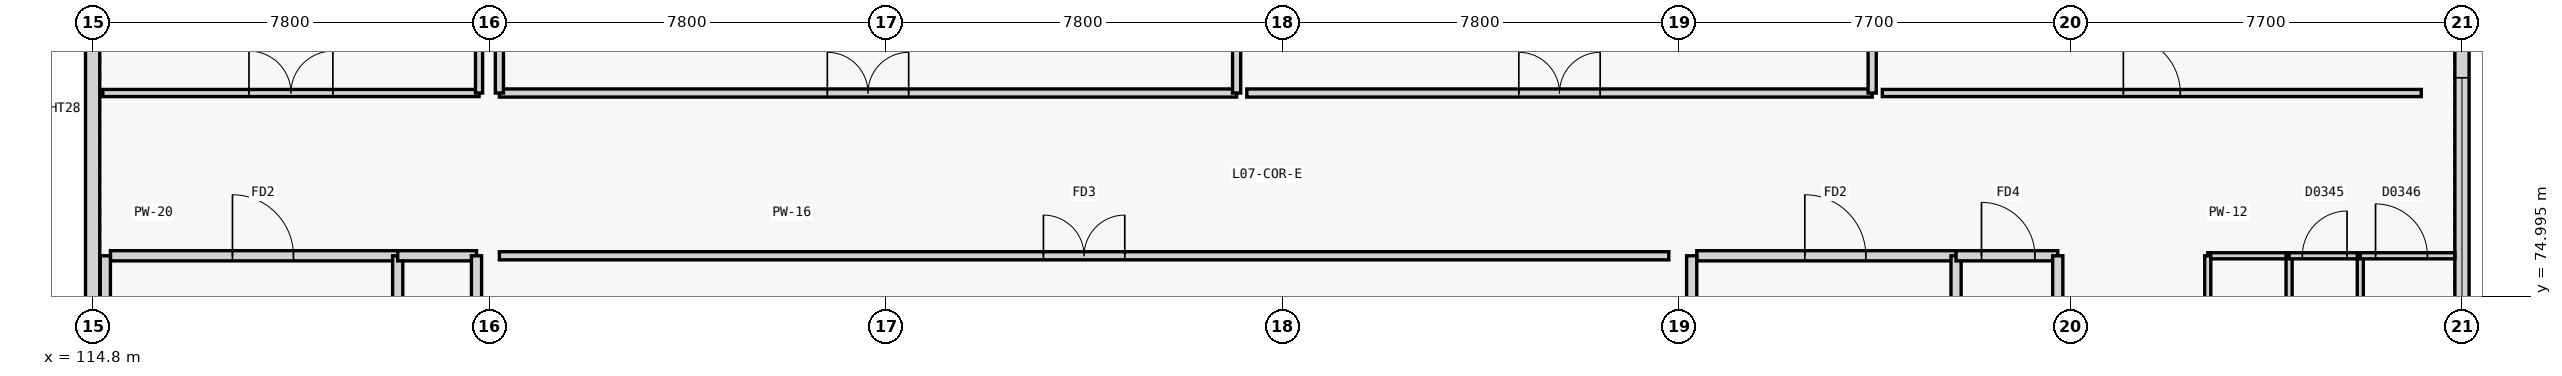
"""IFC4 building model, lengths in metres.
Left out: names, types, materials, properties, quantities, classifications, styles, units other than length and angle.
Written with IfcOpenShell. Run it as: python <this file> out.ifc"""

import sys

from ifc_helpers import new_model, si_unit, direction, frame, frame_2d, origin, place, context, subcontext, project, spatial, rectangle, extrude, element, fill, save


model = new_model("IFC4")
c1 = context("Model", 3, precision=1e-05, world=origin(), true_north=direction((0.0, 1.0)))
c2 = subcontext(c1, "Body", "Model", "MODEL_VIEW")
j1 = project(units=[si_unit("LENGTHUNIT", "METRE"), si_unit("PLANEANGLEUNIT", "RADIAN")], contexts=[c1])
p1 = place(None, origin())
s1 = spatial("IfcSite", under=j1, at=p1, CompositionType="ELEMENT")
p2 = place(p1, origin())
s2 = spatial("IfcBuilding", under=s1, at=p2, CompositionType="ELEMENT")
p3 = place(p2, frame((0.0, 0.0, 28.8)))
s3 = spatial("IfcBuildingStorey", under=s2, at=p3, CompositionType="ELEMENT", Elevation=28.8)
p4 = place(p3, frame((161.4, 96.792, 0.0), z_axis=(0.0, 0.0, 1.0), x_axis=(0.0, -1.0, 0.0)))
e1 = element("IfcWall", 1, at=p4, inside=s3, PredefinedType="SOLIDWALL", context=c2, shape_type="SweptSolid", body=[
    extrude(rectangle(XDim=32.584, YDim=0.28, at=frame_2d((16.292, 0.0))), origin(), (0.0, 0.0, 1.0), 2.78),
])
p5 = place(p4, frame((17.492, 0.0, 0.82)))
e2 = element("IfcOpeningElement", 2, at=p5, cuts=e1, PredefinedType="OPENING", context=c2, shape_type="SweptSolid", body=[
    extrude(rectangle(XDim=4.8, YDim=1.55, at=frame_2d((2.4, 0.775))), frame((0.0, 0.15, 0.0), z_axis=(0.0, -1.0, 0.0), x_axis=(1.0, 0.0, 0.0)), (0.0, 0.0, 1.0), 0.3),
])
p6 = place(p3, frame((114.8, 72.6, 0.0), z_axis=(0.0, 0.0, 1.0), x_axis=(0.0, 1.0, 0.0)))
e3 = element("IfcWall", 3, at=p6, inside=s3, PredefinedType="SOLIDWALL", context=c2, shape_type="SweptSolid", body=[
    extrude(rectangle(XDim=12.2, YDim=0.28, at=frame_2d((6.1, 0.0))), origin(), (0.0, 0.0, 1.0), 2.78),
])
p7 = place(p3, frame((115.15, 75.8, 0.0), z_axis=(0.0, 0.0, 1.0), x_axis=(1.0, 0.0, 0.0)))
e4 = element("IfcWall", 4, at=p7, inside=s3, PredefinedType="PARTITIONING", context=c2, shape_type="SweptSolid", body=[
    extrude(rectangle(XDim=5.65, YDim=0.2, at=frame_2d((2.825, 0.0))), origin(), (0.0, 0.0, 1.0), 3.32),
])
p8 = place(p7, frame((2.4, 0.0, 0.0)))
e5 = element("IfcOpeningElement", 5, at=p8, cuts=e4, PredefinedType="OPENING", context=c2, shape_type="SweptSolid", body=[
    extrude(rectangle(XDim=1.2, YDim=2.2, at=frame_2d((0.6, 1.1))), frame((0.0, 0.11, 0.0), z_axis=(0.0, -1.0, 0.0), x_axis=(1.0, 0.0, 0.0)), (0.0, 0.0, 1.0), 0.22),
])
p9 = place(p3, frame((115.05, 72.4, 0.0), z_axis=(0.0, 0.0, 1.0), x_axis=(0.0, 1.0, 0.0)))
e6 = element("IfcWall", 6, at=p9, inside=s3, PredefinedType="PARTITIONING", context=c2, shape_type="SweptSolid", body=[
    extrude(rectangle(XDim=3.4, YDim=0.2, at=frame_2d((1.7, 0.0))), origin(), (0.0, 0.0, 1.0), 2.78),
])
p10 = place(p3, frame((120.8, 72.4, 0.0), z_axis=(0.0, 0.0, 1.0), x_axis=(0.0, 1.0, 0.0)))
e7 = element("IfcWall", 7, at=p10, inside=s3, PredefinedType="PARTITIONING", context=c2, shape_type="SweptSolid", body=[
    extrude(rectangle(XDim=3.4, YDim=0.2, at=frame_2d((1.7, 0.0))), origin(), (0.0, 0.0, 1.0), 3.32),
])
p11 = place(p10, frame((1.1, 0.0, 0.0)))
e8 = element("IfcOpeningElement", 8, at=p11, cuts=e7, PredefinedType="OPENING", context=c2, shape_type="SweptSolid", body=[
    extrude(rectangle(XDim=1.2, YDim=2.2, at=frame_2d((0.6, 1.1))), frame((0.0, 0.11, 0.0), z_axis=(0.0, -1.0, 0.0), x_axis=(1.0, 0.0, 0.0)), (0.0, 0.0, 1.0), 0.22),
])
p12 = place(p3, frame((120.8, 75.8, 0.0), z_axis=(0.0, 0.0, 1.0), x_axis=(1.0, 0.0, 0.0)))
e9 = element("IfcWall", 9, at=p12, inside=s3, PredefinedType="PARTITIONING", context=c2, shape_type="SweptSolid", body=[
    extrude(rectangle(XDim=1.55, YDim=0.2, at=frame_2d((0.775, 0.0))), origin(), (0.0, 0.0, 1.0), 3.32),
])
p13 = place(p3, frame((122.35, 72.4, 0.0), z_axis=(0.0, 0.0, 1.0), x_axis=(0.0, 1.0, 0.0)))
e10 = element("IfcWall", 10, at=p13, inside=s3, PredefinedType="PARTITIONING", context=c2, shape_type="SweptSolid", body=[
    extrude(rectangle(XDim=3.4, YDim=0.2, at=frame_2d((1.7, 0.0))), origin(), (0.0, 0.0, 1.0), 2.82),
])
p14 = place(p3, frame((146.35, 75.8, 0.0), z_axis=(0.0, 0.0, 1.0), x_axis=(1.0, 0.0, 0.0)))
e11 = element("IfcWall", 11, at=p14, inside=s3, PredefinedType="PARTITIONING", context=c2, shape_type="SweptSolid", body=[
    extrude(rectangle(XDim=5.1, YDim=0.2, at=frame_2d((2.55, 0.0))), origin(), (0.0, 0.0, 1.0), 3.32),
])
p15 = place(p14, frame((2.125, 0.0, 0.0)))
e12 = element("IfcOpeningElement", 12, at=p15, cuts=e11, PredefinedType="OPENING", context=c2, shape_type="SweptSolid", body=[
    extrude(rectangle(XDim=1.2, YDim=2.2, at=frame_2d((0.6, 1.1))), frame((0.0, 0.11, 0.0), z_axis=(0.0, -1.0, 0.0), x_axis=(1.0, 0.0, 0.0)), (0.0, 0.0, 1.0), 0.22),
])
p16 = place(p3, frame((146.25, 72.4, 0.0), z_axis=(0.0, 0.0, 1.0), x_axis=(0.0, 1.0, 0.0)))
e13 = element("IfcWall", 13, at=p16, inside=s3, PredefinedType="PARTITIONING", context=c2, shape_type="SweptSolid", body=[
    extrude(rectangle(XDim=3.4, YDim=0.2, at=frame_2d((1.7, 0.0))), origin(), (0.0, 0.0, 1.0), 2.82),
])
p17 = place(p3, frame((151.45, 72.4, 0.0), z_axis=(0.0, 0.0, 1.0), x_axis=(0.0, 1.0, 0.0)))
e14 = element("IfcWall", 14, at=p17, inside=s3, PredefinedType="PARTITIONING", context=c2, shape_type="SweptSolid", body=[
    extrude(rectangle(XDim=3.4, YDim=0.2, at=frame_2d((1.7, 0.0))), origin(), (0.0, 0.0, 1.0), 3.32),
])
p18 = place(p17, frame((1.1, 0.0, 0.0)))
e15 = element("IfcOpeningElement", 15, at=p18, cuts=e14, PredefinedType="OPENING", context=c2, shape_type="SweptSolid", body=[
    extrude(rectangle(XDim=1.2, YDim=2.2, at=frame_2d((0.6, 1.1))), frame((0.0, 0.11, 0.0), z_axis=(0.0, -1.0, 0.0), x_axis=(1.0, 0.0, 0.0)), (0.0, 0.0, 1.0), 0.22),
])
p19 = place(p3, frame((151.45, 75.8, 0.0), z_axis=(0.0, 0.0, 1.0), x_axis=(1.0, 0.0, 0.0)))
e16 = element("IfcWall", 16, at=p19, inside=s3, PredefinedType="PARTITIONING", context=c2, shape_type="SweptSolid", body=[
    extrude(rectangle(XDim=2.0, YDim=0.2, at=frame_2d((1.0, 0.0))), origin(), (0.0, 0.0, 1.0), 3.32),
])
p20 = place(p19, frame((0.5, 0.0, 0.0)))
e17 = element("IfcOpeningElement", 17, at=p20, cuts=e16, PredefinedType="OPENING", context=c2, shape_type="SweptSolid", body=[
    extrude(rectangle(XDim=1.05, YDim=2.15, at=frame_2d((0.525, 1.075))), frame((0.0, 0.11, 0.0), z_axis=(0.0, -1.0, 0.0), x_axis=(1.0, 0.0, 0.0)), (0.0, 0.0, 1.0), 0.22),
])
p21 = place(p3, frame((153.45, 72.4, 0.0), z_axis=(0.0, 0.0, 1.0), x_axis=(0.0, 1.0, 0.0)))
e18 = element("IfcWall", 18, at=p21, inside=s3, PredefinedType="PARTITIONING", context=c2, shape_type="SweptSolid", body=[
    extrude(rectangle(XDim=3.4, YDim=0.2, at=frame_2d((1.7, 0.0))), origin(), (0.0, 0.0, 1.0), 2.82),
])
p22 = place(p3, frame((115.0, 79.0, 0.0), z_axis=(0.0, 0.0, 1.0), x_axis=(1.0, 0.0, 0.0)))
e19 = element("IfcWall", 19, at=p22, inside=s3, PredefinedType="PARTITIONING", context=c2, shape_type="SweptSolid", body=[
    extrude(rectangle(XDim=7.4, YDim=0.14, at=frame_2d((3.7, 0.0))), origin(), (0.0, 0.0, 1.0), 3.34),
])
p23 = place(p22, frame((2.875, 0.0, 0.0)))
e20 = element("IfcOpeningElement", 20, at=p23, cuts=e19, PredefinedType="OPENING", context=c2, shape_type="SweptSolid", body=[
    extrude(rectangle(XDim=1.65, YDim=2.3, at=frame_2d((0.825, 1.15))), frame((0.0, 0.08, 0.0), z_axis=(0.0, -1.0, 0.0), x_axis=(1.0, 0.0, 0.0)), (0.0, 0.0, 1.0), 0.16),
])
p24 = place(p3, frame((122.4, 79.0, 0.0), z_axis=(0.0, 0.0, 1.0), x_axis=(0.0, 1.0, 0.0)))
e21 = element("IfcWall", 21, at=p24, inside=s3, PredefinedType="PARTITIONING", context=c2, shape_type="SweptSolid", body=[
    extrude(rectangle(XDim=5.4, YDim=0.14, at=frame_2d((2.7, 0.0))), origin(), (0.0, 0.0, 1.0), 2.82),
])
p25 = place(p3, frame((122.8, 75.8, 0.0), z_axis=(0.0, 0.0, 1.0), x_axis=(1.0, 0.0, 0.0)))
e22 = element("IfcWall", 22, at=p25, inside=s3, PredefinedType="PARTITIONING", context=c2, shape_type="SweptSolid", body=[
    extrude(rectangle(XDim=23.0, YDim=0.16, at=frame_2d((11.5, 0.0))), origin(), (0.0, 0.0, 1.0), 3.34),
])
p26 = place(p25, frame((10.7, 0.0, 0.0)))
e23 = element("IfcOpeningElement", 23, at=p26, cuts=e22, PredefinedType="OPENING", context=c2, shape_type="SweptSolid", body=[
    extrude(rectangle(XDim=1.6, YDim=2.2, at=frame_2d((0.8, 1.1))), frame((0.0, 0.09, 0.0), z_axis=(0.0, -1.0, 0.0), x_axis=(1.0, 0.0, 0.0)), (0.0, 0.0, 1.0), 0.18),
])
p27 = place(p3, frame((156.4, 75.8, 0.0), z_axis=(0.0, 0.0, 1.0), x_axis=(1.0, 0.0, 0.0)))
e24 = element("IfcWall", 24, at=p27, inside=s3, PredefinedType="PARTITIONING", context=c2, shape_type="SweptSolid", body=[
    extrude(rectangle(XDim=1.6, YDim=0.12, at=frame_2d((0.8, 0.0))), origin(), (0.0, 0.0, 1.0), 3.34),
])
p28 = place(p3, frame((156.4, 70.6, 0.0), z_axis=(0.0, 0.0, 1.0), x_axis=(0.0, 1.0, 0.0)))
e25 = element("IfcWall", 25, at=p28, inside=s3, PredefinedType="PARTITIONING", context=c2, shape_type="SweptSolid", body=[
    extrude(rectangle(XDim=5.2, YDim=0.12, at=frame_2d((2.6, 0.0))), origin(), (0.0, 0.0, 1.0), 3.34),
])
p29 = place(p28, frame((2.16, 0.0, 0.0)))
e26 = element("IfcOpeningElement", 26, at=p29, cuts=e25, PredefinedType="OPENING", context=c2, shape_type="SweptSolid", body=[
    extrude(rectangle(XDim=0.88, YDim=2.1, at=frame_2d((0.44, 1.05))), frame((0.0, 0.07, 0.0), z_axis=(0.0, -1.0, 0.0), x_axis=(1.0, 0.0, 0.0)), (0.0, 0.0, 1.0), 0.14),
])
p30 = place(p3, frame((158.0, 70.6, 0.0), z_axis=(0.0, 0.0, 1.0), x_axis=(0.0, 1.0, 0.0)))
e27 = element("IfcWall", 27, at=p30, inside=s3, PredefinedType="PARTITIONING", context=c2, shape_type="SweptSolid", body=[
    extrude(rectangle(XDim=5.2, YDim=0.12, at=frame_2d((2.6, 0.0))), origin(), (0.0, 0.0, 1.0), 3.34),
])
p31 = place(p3, frame((158.0, 75.8, 0.0), z_axis=(0.0, 0.0, 1.0), x_axis=(1.0, 0.0, 0.0)))
e28 = element("IfcWall", 28, at=p31, inside=s3, PredefinedType="PARTITIONING", context=c2, shape_type="SweptSolid", body=[
    extrude(rectangle(XDim=1.4, YDim=0.12, at=frame_2d((0.7, 0.0))), origin(), (0.0, 0.0, 1.0), 3.34),
])
p32 = place(p31, frame((0.26, 0.0, 0.0)))
e29 = element("IfcOpeningElement", 29, at=p32, cuts=e28, PredefinedType="OPENING", context=c2, shape_type="SweptSolid", body=[
    extrude(rectangle(XDim=0.88, YDim=2.1, at=frame_2d((0.44, 1.05))), frame((0.0, 0.07, 0.0), z_axis=(0.0, -1.0, 0.0), x_axis=(1.0, 0.0, 0.0)), (0.0, 0.0, 1.0), 0.14),
])
p33 = place(p3, frame((159.4, 70.6, 0.0), z_axis=(0.0, 0.0, 1.0), x_axis=(0.0, 1.0, 0.0)))
e30 = element("IfcWall", 30, at=p33, inside=s3, PredefinedType="PARTITIONING", context=c2, shape_type="SweptSolid", body=[
    extrude(rectangle(XDim=5.2, YDim=0.12, at=frame_2d((2.6, 0.0))), origin(), (0.0, 0.0, 1.0), 3.34),
])
p34 = place(p3, frame((159.4, 75.8, 0.0), z_axis=(0.0, 0.0, 1.0), x_axis=(1.0, 0.0, 0.0)))
e31 = element("IfcWall", 31, at=p34, inside=s3, PredefinedType="PARTITIONING", context=c2, shape_type="SweptSolid", body=[
    extrude(rectangle(XDim=1.86, YDim=0.12, at=frame_2d((0.93, 0.0))), origin(), (0.0, 0.0, 1.0), 3.34),
])
p35 = place(p34, frame((0.3, 0.0, 0.0)))
e32 = element("IfcOpeningElement", 32, at=p35, cuts=e31, PredefinedType="OPENING", context=c2, shape_type="SweptSolid", body=[
    extrude(rectangle(XDim=1.02, YDim=2.1, at=frame_2d((0.51, 1.05))), frame((0.0, 0.07, 0.0), z_axis=(0.0, -1.0, 0.0), x_axis=(1.0, 0.0, 0.0)), (0.0, 0.0, 1.0), 0.14),
])
p36 = place(p3, frame((122.8, 79.0, 0.0), z_axis=(0.0, 0.0, 1.0), x_axis=(1.0, 0.0, 0.0)))
e33 = element("IfcWall", 33, at=p36, inside=s3, PredefinedType="PARTITIONING", context=c2, shape_type="SweptSolid", body=[
    extrude(rectangle(XDim=14.5, YDim=0.16, at=frame_2d((7.25, 0.0))), origin(), (0.0, 0.0, 1.0), 3.34),
])
p37 = place(p36, frame((6.45, 0.0, 0.0)))
e34 = element("IfcOpeningElement", 34, at=p37, cuts=e33, PredefinedType="OPENING", context=c2, shape_type="SweptSolid", body=[
    extrude(rectangle(XDim=1.6, YDim=2.2, at=frame_2d((0.8, 1.1))), frame((0.0, 0.09, 0.0), z_axis=(0.0, -1.0, 0.0), x_axis=(1.0, 0.0, 0.0)), (0.0, 0.0, 1.0), 0.18),
])
p38 = place(p3, frame((122.8, 79.0, 0.0), z_axis=(0.0, 0.0, 1.0), x_axis=(0.0, 1.0, 0.0)))
e35 = element("IfcWall", 35, at=p38, inside=s3, PredefinedType="PARTITIONING", context=c2, shape_type="SweptSolid", body=[
    extrude(rectangle(XDim=17.6, YDim=0.16, at=frame_2d((8.8, 0.0))), origin(), (0.0, 0.0, 1.0), 2.82),
])
p39 = place(p3, frame((137.3, 79.0, 0.0), z_axis=(0.0, 0.0, 1.0), x_axis=(0.0, 1.0, 0.0)))
e36 = element("IfcWall", 36, at=p39, inside=s3, PredefinedType="PARTITIONING", context=c2, shape_type="SweptSolid", body=[
    extrude(rectangle(XDim=17.6, YDim=0.16, at=frame_2d((8.8, 0.0))), origin(), (0.0, 0.0, 1.0), 3.34),
])
p40 = place(p3, frame((137.5, 79.0, 0.0), z_axis=(0.0, 0.0, 1.0), x_axis=(1.0, 0.0, 0.0)))
e37 = element("IfcWall", 37, at=p40, inside=s3, PredefinedType="PARTITIONING", context=c2, shape_type="SweptSolid", body=[
    extrude(rectangle(XDim=12.3, YDim=0.16, at=frame_2d((6.15, 0.0))), origin(), (0.0, 0.0, 1.0), 3.34),
])
p41 = place(p40, frame((5.35, 0.0, 0.0)))
e38 = element("IfcOpeningElement", 38, at=p41, cuts=e37, PredefinedType="OPENING", context=c2, shape_type="SweptSolid", body=[
    extrude(rectangle(XDim=1.6, YDim=2.2, at=frame_2d((0.8, 1.1))), frame((0.0, 0.09, 0.0), z_axis=(0.0, -1.0, 0.0), x_axis=(1.0, 0.0, 0.0)), (0.0, 0.0, 1.0), 0.18),
])
p42 = place(p3, frame((149.8, 79.0, 0.0), z_axis=(0.0, 0.0, 1.0), x_axis=(0.0, 1.0, 0.0)))
e39 = element("IfcWall", 39, at=p42, inside=s3, PredefinedType="PARTITIONING", context=c2, shape_type="SweptSolid", body=[
    extrude(rectangle(XDim=17.6, YDim=0.16, at=frame_2d((8.8, 0.0))), origin(), (0.0, 0.0, 1.0), 2.9),
])
p43 = place(p3, frame((150.0, 79.0, 0.0), z_axis=(0.0, 0.0, 1.0), x_axis=(1.0, 0.0, 0.0)))
e40 = element("IfcWall", 40, at=p43, inside=s3, PredefinedType="PARTITIONING", context=c2, shape_type="SweptSolid", body=[
    extrude(rectangle(XDim=10.6, YDim=0.14, at=frame_2d((5.3, 0.0))), origin(), (0.0, 0.0, 1.0), 3.34),
])
p44 = place(p43, frame((4.74, 0.0, 0.0)))
e41 = element("IfcOpeningElement", 41, at=p44, cuts=e40, PredefinedType="OPENING", context=c2, shape_type="SweptSolid", body=[
    extrude(rectangle(XDim=1.12, YDim=2.15, at=frame_2d((0.56, 1.075))), frame((0.0, 0.08, 0.0), z_axis=(0.0, -1.0, 0.0), x_axis=(1.0, 0.0, 0.0)), (0.0, 0.0, 1.0), 0.16),
])
p45 = place(p5, origin())
e42 = element("IfcWindow", 42, at=p45, inside=s3, PartitioningType="SINGLE_PANEL", PredefinedType="WINDOW", context=c2, shape_type="SweptSolid", body=[
    extrude(rectangle(XDim=4.8, YDim=1.55, at=frame_2d((2.4, 0.775))), frame((0.0, 0.03, 0.0), z_axis=(0.0, -1.0, 0.0), x_axis=(1.0, 0.0, 0.0)), (0.0, 0.0, 1.0), 0.06),
])
fill(e2, e42)
p46 = place(p8, origin())
e43 = element("IfcDoor", 43, at=p46, inside=s3, OperationType="SINGLE_SWING_LEFT", PredefinedType="DOOR", context=c2, shape_type="SweptSolid", body=[
    extrude(rectangle(XDim=1.2, YDim=2.2, at=frame_2d((0.6, 1.1))), frame((0.0, 0.025, 0.0), z_axis=(0.0, -1.0, 0.0), x_axis=(1.0, 0.0, 0.0)), (0.0, 0.0, 1.0), 0.05),
])
fill(e5, e43)
p47 = place(p15, origin())
e44 = element("IfcDoor", 44, at=p47, inside=s3, OperationType="SINGLE_SWING_LEFT", PredefinedType="DOOR", context=c2, shape_type="SweptSolid", body=[
    extrude(rectangle(XDim=1.2, YDim=2.2, at=frame_2d((0.6, 1.1))), frame((0.0, 0.025, 0.0), z_axis=(0.0, -1.0, 0.0), x_axis=(1.0, 0.0, 0.0)), (0.0, 0.0, 1.0), 0.05),
])
fill(e12, e44)
p48 = place(p20, origin())
e45 = element("IfcDoor", 45, at=p48, inside=s3, OperationType="SINGLE_SWING_LEFT", PredefinedType="DOOR", context=c2, shape_type="SweptSolid", body=[
    extrude(rectangle(XDim=1.05, YDim=2.15, at=frame_2d((0.525, 1.075))), frame((0.0, 0.025, 0.0), z_axis=(0.0, -1.0, 0.0), x_axis=(1.0, 0.0, 0.0)), (0.0, 0.0, 1.0), 0.05),
])
fill(e17, e45)
p49 = place(p23, origin())
e46 = element("IfcDoor", 46, at=p49, inside=s3, OperationType="DOUBLE_DOOR_SINGLE_SWING", PredefinedType="DOOR", context=c2, shape_type="SweptSolid", body=[
    extrude(rectangle(XDim=1.65, YDim=2.3, at=frame_2d((0.825, 1.15))), frame((0.0, 0.025, 0.0), z_axis=(0.0, -1.0, 0.0), x_axis=(1.0, 0.0, 0.0)), (0.0, 0.0, 1.0), 0.05),
])
fill(e20, e46)
p50 = place(p26, origin())
e47 = element("IfcDoor", 47, at=p50, inside=s3, OperationType="DOUBLE_DOOR_SINGLE_SWING", PredefinedType="DOOR", context=c2, shape_type="SweptSolid", body=[
    extrude(rectangle(XDim=1.6, YDim=2.2, at=frame_2d((0.8, 1.1))), frame((0.0, 0.025, 0.0), z_axis=(0.0, -1.0, 0.0), x_axis=(1.0, 0.0, 0.0)), (0.0, 0.0, 1.0), 0.05),
])
fill(e23, e47)
p51 = place(p32, origin())
e48 = element("IfcDoor", 48, at=p51, inside=s3, OperationType="SINGLE_SWING_RIGHT", PredefinedType="DOOR", context=c2, shape_type="SweptSolid", body=[
    extrude(rectangle(XDim=0.88, YDim=2.1, at=frame_2d((0.44, 1.05))), frame((0.0, 0.025, 0.0), z_axis=(0.0, -1.0, 0.0), x_axis=(1.0, 0.0, 0.0)), (0.0, 0.0, 1.0), 0.05),
])
fill(e29, e48)
p52 = place(p35, origin())
e49 = element("IfcDoor", 49, at=p52, inside=s3, OperationType="SINGLE_SWING_LEFT", PredefinedType="DOOR", context=c2, shape_type="SweptSolid", body=[
    extrude(rectangle(XDim=1.02, YDim=2.1, at=frame_2d((0.51, 1.05))), frame((0.0, 0.025, 0.0), z_axis=(0.0, -1.0, 0.0), x_axis=(1.0, 0.0, 0.0)), (0.0, 0.0, 1.0), 0.05),
])
fill(e32, e49)
p53 = place(p37, origin())
e50 = element("IfcDoor", 50, at=p53, inside=s3, OperationType="DOUBLE_DOOR_SINGLE_SWING", PredefinedType="DOOR", context=c2, shape_type="SweptSolid", body=[
    extrude(rectangle(XDim=1.6, YDim=2.2, at=frame_2d((0.8, 1.1))), frame((0.0, 0.025, 0.0), z_axis=(0.0, -1.0, 0.0), x_axis=(1.0, 0.0, 0.0)), (0.0, 0.0, 1.0), 0.05),
])
fill(e34, e50)
p54 = place(p41, origin())
e51 = element("IfcDoor", 51, at=p54, inside=s3, OperationType="DOUBLE_DOOR_SINGLE_SWING", PredefinedType="DOOR", context=c2, shape_type="SweptSolid", body=[
    extrude(rectangle(XDim=1.6, YDim=2.2, at=frame_2d((0.8, 1.1))), frame((0.0, 0.025, 0.0), z_axis=(0.0, -1.0, 0.0), x_axis=(1.0, 0.0, 0.0)), (0.0, 0.0, 1.0), 0.05),
])
fill(e38, e51)
p55 = place(p44, origin())
e52 = element("IfcDoor", 52, at=p55, inside=s3, OperationType="SINGLE_SWING_LEFT", PredefinedType="DOOR", context=c2, shape_type="SweptSolid", body=[
    extrude(rectangle(XDim=1.12, YDim=2.15, at=frame_2d((0.56, 1.075))), frame((0.0, 0.025, 0.0), z_axis=(0.0, -1.0, 0.0), x_axis=(1.0, 0.0, 0.0)), (0.0, 0.0, 1.0), 0.05),
])
fill(e41, e52)
save(model, sys.argv[1])
